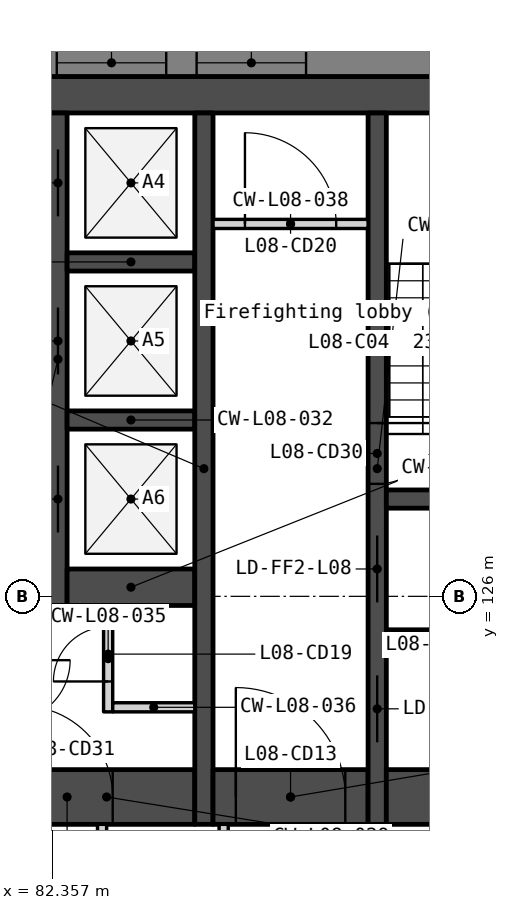
"""IFC4 building model, lengths in metres.
Left out: names, types, materials, properties, quantities, classifications, styles, units other than length and angle.
Written with IfcOpenShell. Run it as: python <this file> out.ifc"""

import sys

from ifc_helpers import new_model, si_unit, direction, frame, frame_2d, origin, place, context, subcontext, project, spatial, polyline, rectangle, outline, extrude, element, fill, save


model = new_model("IFC4")
c1 = context("Model", 3, precision=1e-05, world=origin(), true_north=direction((0.0, 1.0)))
c2 = subcontext(c1, "Body", "Model", "MODEL_VIEW")
j1 = project(units=[si_unit("LENGTHUNIT", "METRE"), si_unit("PLANEANGLEUNIT", "RADIAN")], contexts=[c1])
p1 = place(None, origin())
s1 = spatial("IfcSite", under=j1, at=p1, CompositionType="ELEMENT")
p2 = place(p1, origin())
s2 = spatial("IfcBuilding", under=s1, at=p2, CompositionType="ELEMENT")
p3 = place(p2, frame((0.0, 0.0, 42.0)))
s3 = spatial("IfcBuildingStorey", under=s2, at=p3, CompositionType="ELEMENT", Elevation=42.0)
p4 = place(p3, frame((66.0, 134.25, 0.0), z_axis=(0.0, 0.0, 1.0), x_axis=(1.0, 0.0, 0.0)))
e1 = element("IfcWall", 1, at=p4, inside=s3, PredefinedType="SOLIDWALL", context=c2, shape_type="SweptSolid", body=[
    extrude(rectangle(XDim=28.0, YDim=0.6, at=frame_2d((14.0, 0.0))), origin(), (0.0, 0.0, 1.0), 3.35),
])
p5 = place(p3, frame((81.8, 122.7, 0.0), z_axis=(0.0, 0.0, 1.0), x_axis=(1.0, 0.0, 0.0)))
e2 = element("IfcWall", 2, at=p5, inside=s3, PredefinedType="SOLIDWALL", context=c2, shape_type="SweptSolid", body=[
    extrude(rectangle(XDim=2.9, YDim=0.9, at=frame_2d((1.45, 0.0))), origin(), (0.0, 0.0, 1.0), 3.35),
])
p6 = place(p5, frame((0.05, 0.0, 0.0)))
e3 = element("IfcOpeningElement", 3, at=p6, cuts=e2, PredefinedType="OPENING", context=c2, shape_type="SweptSolid", body=[
    extrude(rectangle(XDim=1.5, YDim=2.1, at=frame_2d((0.75, 1.05))), frame((0.0, 0.46, 0.0), z_axis=(0.0, -1.0, 0.0), x_axis=(1.0, 0.0, 0.0)), (0.0, 0.0, 1.0), 0.92),
])
p7 = place(p3, frame((82.45, 133.95, 0.0), z_axis=(0.0, 0.0, 1.0), x_axis=(0.0, -1.0, 0.0)))
e4 = element("IfcWall", 4, at=p7, inside=s3, PredefinedType="SOLIDWALL", context=c2, shape_type="SweptSolid", body=[
    extrude(rectangle(XDim=8.1, YDim=0.3, at=frame_2d((4.05, 0.0))), origin(), (0.0, 0.0, 1.0), 3.35),
])
p8 = place(p7, frame((0.6, 0.0, 0.0)))
e5 = element("IfcOpeningElement", 5, at=p8, cuts=e4, PredefinedType="OPENING", context=c2, shape_type="SweptSolid", body=[
    extrude(rectangle(XDim=1.1, YDim=2.1, at=frame_2d((0.55, 1.05))), frame((0.0, 0.16, 0.0), z_axis=(0.0, -1.0, 0.0), x_axis=(1.0, 0.0, 0.0)), (0.0, 0.0, 1.0), 0.32),
])
p9 = place(p7, frame((3.2, 0.0, 0.0)))
e6 = element("IfcOpeningElement", 6, at=p9, cuts=e4, PredefinedType="OPENING", context=c2, shape_type="SweptSolid", body=[
    extrude(rectangle(XDim=1.1, YDim=2.1, at=frame_2d((0.55, 1.05))), frame((0.0, 0.16, 0.0), z_axis=(0.0, -1.0, 0.0), x_axis=(1.0, 0.0, 0.0)), (0.0, 0.0, 1.0), 0.32),
])
p10 = place(p7, frame((5.8, 0.0, 0.0)))
e7 = element("IfcOpeningElement", 7, at=p10, cuts=e4, PredefinedType="OPENING", context=c2, shape_type="SweptSolid", body=[
    extrude(rectangle(XDim=1.1, YDim=2.1, at=frame_2d((0.55, 1.05))), frame((0.0, 0.16, 0.0), z_axis=(0.0, -1.0, 0.0), x_axis=(1.0, 0.0, 0.0)), (0.0, 0.0, 1.0), 0.32),
])
for number, where, z_axis, x_axis in (
    (8, (82.6, 131.5, 0.0), (0.0, 0.0, 1.0), (1.0, 0.0, 0.0)),
    (9, (82.6, 128.9, 0.0), (0.0, 0.0, 1.0), (1.0, 0.0, 0.0)),
):
    element("IfcWall", number, at=place(p3, frame(where, z_axis=z_axis, x_axis=x_axis)), inside=s3, PredefinedType="SOLIDWALL", context=c2, shape_type="SweptSolid", body=[
        extrude(rectangle(XDim=2.1, YDim=0.3, at=frame_2d((1.05, 0.0))), origin(), (0.0, 0.0, 1.0), 3.35),
    ])
p11 = place(p3, frame((82.6, 126.15, 0.0), z_axis=(0.0, 0.0, 1.0), x_axis=(1.0, 0.0, 0.0)))
e10 = element("IfcWall", 10, at=p11, inside=s3, PredefinedType="SOLIDWALL", context=c2, shape_type="SweptSolid", body=[
    extrude(rectangle(XDim=2.1, YDim=0.6, at=frame_2d((1.05, 0.0))), origin(), (0.0, 0.0, 1.0), 3.35),
])
p12 = place(p3, frame((83.175, 122.25, 0.0), z_axis=(0.0, 0.0, 1.0), x_axis=(0.0, -1.0, 0.0)))
e11 = element("IfcWall", 11, at=p12, inside=s3, PredefinedType="PARTITIONING", context=c2, shape_type="SweptSolid", body=[
    extrude(rectangle(XDim=2.1, YDim=0.15, at=frame_2d((1.05, 0.0))), origin(), (0.0, 0.0, 1.0), 3.35),
])
p13 = place(p3, frame((83.275, 125.85, 0.0), z_axis=(0.0, 0.0, 1.0), x_axis=(0.0, -1.0, 0.0)))
e12 = element("IfcWall", 12, at=p13, inside=s3, PredefinedType="PARTITIONING", context=c2, shape_type="SweptSolid", body=[
    extrude(rectangle(XDim=1.75, YDim=0.15, at=frame_2d((0.875, 0.0))), origin(), (0.0, 0.0, 1.0), 3.35),
])
p14 = place(p13, frame((0.35, 0.0, 0.0)))
e13 = element("IfcOpeningElement", 13, at=p14, cuts=e12, PredefinedType="OPENING", context=c2, shape_type="SweptSolid", body=[
    extrude(rectangle(XDim=0.9, YDim=2.1, at=frame_2d((0.45, 1.05))), frame((0.0, 0.085, 0.0), z_axis=(0.0, -1.0, 0.0), x_axis=(1.0, 0.0, 0.0)), (0.0, 0.0, 1.0), 0.17),
])
p15 = place(p3, frame((83.35, 124.175, 0.0), z_axis=(0.0, 0.0, 1.0), x_axis=(1.0, 0.0, 0.0)))
e14 = element("IfcWall", 14, at=p15, inside=s3, PredefinedType="PARTITIONING", context=c2, shape_type="SweptSolid", body=[
    extrude(rectangle(XDim=1.35, YDim=0.15, at=frame_2d((0.675, 0.0))), origin(), (0.0, 0.0, 1.0), 3.35),
])
p16 = place(p3, frame((84.85, 133.95, 0.0), z_axis=(0.0, 0.0, 1.0), x_axis=(0.0, -1.0, 0.0)))
e15 = element("IfcWall", 15, at=p16, inside=s3, PredefinedType="SOLIDWALL", context=c2, shape_type="SweptSolid", body=[
    extrude(rectangle(XDim=11.7, YDim=0.3, at=frame_2d((5.85, 0.0))), origin(), (0.0, 0.0, 1.0), 3.35),
])
p17 = place(p3, frame((85.0, 132.125, 0.0), z_axis=(0.0, 0.0, 1.0), x_axis=(1.0, 0.0, 0.0)))
e16 = element("IfcWall", 16, at=p17, inside=s3, PredefinedType="PARTITIONING", context=c2, shape_type="SweptSolid", body=[
    extrude(rectangle(XDim=2.55, YDim=0.15, at=frame_2d((1.275, 0.0))), origin(), (0.0, 0.0, 1.0), 3.35),
])
p18 = place(p17, frame((0.525, 0.0, 0.0)))
e17 = element("IfcOpeningElement", 17, at=p18, cuts=e16, PredefinedType="OPENING", context=c2, shape_type="SweptSolid", body=[
    extrude(rectangle(XDim=1.5, YDim=2.1, at=frame_2d((0.75, 1.05))), frame((0.0, 0.085, 0.0), z_axis=(0.0, -1.0, 0.0), x_axis=(1.0, 0.0, 0.0)), (0.0, 0.0, 1.0), 0.17),
])
p19 = place(p3, frame((85.0, 122.7, 0.0), z_axis=(0.0, 0.0, 1.0), x_axis=(1.0, 0.0, 0.0)))
e18 = element("IfcWall", 18, at=p19, inside=s3, PredefinedType="SOLIDWALL", context=c2, shape_type="SweptSolid", body=[
    extrude(rectangle(XDim=2.55, YDim=0.9, at=frame_2d((1.275, 0.0))), origin(), (0.0, 0.0, 1.0), 3.35),
])
p20 = place(p19, frame((0.375, 0.0, 0.0)))
e19 = element("IfcOpeningElement", 19, at=p20, cuts=e18, PredefinedType="OPENING", context=c2, shape_type="SweptSolid", body=[
    extrude(rectangle(XDim=1.8, YDim=2.1, at=frame_2d((0.9, 1.05))), frame((0.0, 0.46, 0.0), z_axis=(0.0, -1.0, 0.0), x_axis=(1.0, 0.0, 0.0)), (0.0, 0.0, 1.0), 0.92),
])
p21 = place(p3, frame((85.175, 122.25, 0.0), z_axis=(0.0, 0.0, 1.0), x_axis=(0.0, -1.0, 0.0)))
e20 = element("IfcWall", 20, at=p21, inside=s3, PredefinedType="PARTITIONING", context=c2, shape_type="SweptSolid", body=[
    extrude(rectangle(XDim=2.1, YDim=0.15, at=frame_2d((1.05, 0.0))), origin(), (0.0, 0.0, 1.0), 3.35),
])
p22 = place(p21, frame((0.55, 0.0, 0.0)))
e21 = element("IfcOpeningElement", 21, at=p22, cuts=e20, PredefinedType="OPENING", context=c2, shape_type="SweptSolid", body=[
    extrude(rectangle(XDim=1.0, YDim=2.1, at=frame_2d((0.5, 1.05))), frame((0.0, 0.085, 0.0), z_axis=(0.0, -1.0, 0.0), x_axis=(1.0, 0.0, 0.0)), (0.0, 0.0, 1.0), 0.17),
])
p23 = place(p3, frame((87.375, 122.25, 0.0), z_axis=(0.0, 0.0, 1.0), x_axis=(0.0, -1.0, 0.0)))
e22 = element("IfcWall", 22, at=p23, inside=s3, PredefinedType="PARTITIONING", context=c2, shape_type="SweptSolid", body=[
    extrude(rectangle(XDim=2.1, YDim=0.15, at=frame_2d((1.05, 0.0))), origin(), (0.0, 0.0, 1.0), 3.35),
])
p24 = place(p3, frame((87.7, 133.95, 0.0), z_axis=(0.0, 0.0, 1.0), x_axis=(0.0, -1.0, 0.0)))
e23 = element("IfcWall", 23, at=p24, inside=s3, PredefinedType="SOLIDWALL", context=c2, shape_type="SweptSolid", body=[
    extrude(rectangle(XDim=11.7, YDim=0.3, at=frame_2d((5.85, 0.0))), origin(), (0.0, 0.0, 1.0), 3.35),
])
p25 = place(p24, frame((6.95, 0.0, 0.0)))
e24 = element("IfcOpeningElement", 24, at=p25, cuts=e23, PredefinedType="OPENING", context=c2, shape_type="SweptSolid", body=[
    extrude(rectangle(XDim=1.1, YDim=2.1, at=frame_2d((0.55, 1.05))), frame((0.0, 0.16, 0.0), z_axis=(0.0, -1.0, 0.0), x_axis=(1.0, 0.0, 0.0)), (0.0, 0.0, 1.0), 0.32),
])
p26 = place(p24, frame((5.1, 0.0, 0.0)))
e25 = element("IfcOpeningElement", 25, at=p26, cuts=e23, PredefinedType="OPENING", context=c2, shape_type="SweptSolid", body=[
    extrude(rectangle(XDim=1.0, YDim=2.1, at=frame_2d((0.5, 1.05))), frame((0.0, 0.16, 0.0), z_axis=(0.0, -1.0, 0.0), x_axis=(1.0, 0.0, 0.0)), (0.0, 0.0, 1.0), 0.32),
])
p27 = place(p24, frame((9.25, 0.0, 0.0)))
e26 = element("IfcOpeningElement", 26, at=p27, cuts=e23, PredefinedType="OPENING", context=c2, shape_type="SweptSolid", body=[
    extrude(rectangle(XDim=1.1, YDim=2.1, at=frame_2d((0.55, 1.05))), frame((0.0, 0.16, 0.0), z_axis=(0.0, -1.0, 0.0), x_axis=(1.0, 0.0, 0.0)), (0.0, 0.0, 1.0), 0.32),
])
for number, where, z_axis, x_axis in (
    (27, (87.85, 127.6, 0.0), (0.0, 0.0, 1.0), (1.0, 0.0, 0.0)),
    (28, (87.85, 125.3, 0.0), (0.0, 0.0, 1.0), (1.0, 0.0, 0.0)),
):
    element("IfcWall", number, at=place(p3, frame(where, z_axis=z_axis, x_axis=x_axis)), inside=s3, PredefinedType="SOLIDWALL", context=c2, shape_type="SweptSolid", body=[
        extrude(rectangle(XDim=2.55, YDim=0.3, at=frame_2d((1.275, 0.0))), origin(), (0.0, 0.0, 1.0), 3.35),
    ])
p28 = place(p3, frame((87.85, 122.7, 0.0), z_axis=(0.0, 0.0, 1.0), x_axis=(1.0, 0.0, 0.0)))
e29 = element("IfcWall", 29, at=p28, inside=s3, PredefinedType="SOLIDWALL", context=c2, shape_type="SweptSolid", body=[
    extrude(rectangle(XDim=2.55, YDim=0.9, at=frame_2d((1.275, 0.0))), origin(), (0.0, 0.0, 1.0), 3.35),
])
p29 = place(p3, frame((102.4, 134.775, -0.15), z_axis=(0.0, 0.0, 1.0), x_axis=(-1.0, 0.0, 0.0)))
e30 = element("IfcWall", 30, at=p29, inside=s3, PredefinedType="SOLIDWALL", context=c2, shape_type="SweptSolid", body=[
    extrude(outline(polyline([(44.8, 0.0), (44.8, 3.5), (0.0, 3.5), (0.0, 0.0), (44.8, 0.0)])), frame((0.0, 0.225, 0.0), z_axis=(0.0, -1.0, 0.0), x_axis=(1.0, 0.0, 0.0)), (0.0, 0.0, 1.0), 0.45),
])
p30 = place(p29, frame((0.786, 0.0, 1.05)))
e31 = element("IfcOpeningElement", 31, at=p30, cuts=e30, PredefinedType="OPENING", context=c2, shape_type="SweptSolid", body=[
    extrude(rectangle(XDim=1.2, YDim=1.5, at=frame_2d((0.6, 0.75))), frame((0.0, 0.235, 0.0), z_axis=(0.0, -1.0, 0.0), x_axis=(1.0, 0.0, 0.0)), (0.0, 0.0, 1.0), 0.47),
])
p31 = place(p29, frame((6.91, 0.0, 1.05)))
e32 = element("IfcOpeningElement", 32, at=p31, cuts=e30, PredefinedType="OPENING", context=c2, shape_type="SweptSolid", body=[
    extrude(rectangle(XDim=1.8, YDim=1.5, at=frame_2d((0.9, 0.75))), frame((0.0, 0.235, 0.0), z_axis=(0.0, -1.0, 0.0), x_axis=(1.0, 0.0, 0.0)), (0.0, 0.0, 1.0), 0.47),
])
p32 = place(p29, frame((9.21, 0.0, 1.05)))
e33 = element("IfcOpeningElement", 33, at=p32, cuts=e30, PredefinedType="OPENING", context=c2, shape_type="SweptSolid", body=[
    extrude(rectangle(XDim=1.8, YDim=1.5, at=frame_2d((0.9, 0.75))), frame((0.0, 0.235, 0.0), z_axis=(0.0, -1.0, 0.0), x_axis=(1.0, 0.0, 0.0)), (0.0, 0.0, 1.0), 0.47),
])
p33 = place(p29, frame((15.87, 0.0, 1.05)))
e34 = element("IfcOpeningElement", 34, at=p33, cuts=e30, PredefinedType="OPENING", context=c2, shape_type="SweptSolid", body=[
    extrude(rectangle(XDim=1.8, YDim=1.5, at=frame_2d((0.9, 0.75))), frame((0.0, 0.235, 0.0), z_axis=(0.0, -1.0, 0.0), x_axis=(1.0, 0.0, 0.0)), (0.0, 0.0, 1.0), 0.47),
])
p34 = place(p29, frame((18.17, 0.0, 1.05)))
e35 = element("IfcOpeningElement", 35, at=p34, cuts=e30, PredefinedType="OPENING", context=c2, shape_type="SweptSolid", body=[
    extrude(rectangle(XDim=1.8, YDim=1.5, at=frame_2d((0.9, 0.75))), frame((0.0, 0.235, 0.0), z_axis=(0.0, -1.0, 0.0), x_axis=(1.0, 0.0, 0.0)), (0.0, 0.0, 1.0), 0.47),
])
p35 = place(p29, frame((24.83, 0.0, 1.05)))
e36 = element("IfcOpeningElement", 36, at=p35, cuts=e30, PredefinedType="OPENING", context=c2, shape_type="SweptSolid", body=[
    extrude(rectangle(XDim=1.8, YDim=1.5, at=frame_2d((0.9, 0.75))), frame((0.0, 0.235, 0.0), z_axis=(0.0, -1.0, 0.0), x_axis=(1.0, 0.0, 0.0)), (0.0, 0.0, 1.0), 0.47),
])
p36 = place(p29, frame((27.13, 0.0, 1.05)))
e37 = element("IfcOpeningElement", 37, at=p36, cuts=e30, PredefinedType="OPENING", context=c2, shape_type="SweptSolid", body=[
    extrude(rectangle(XDim=1.8, YDim=1.5, at=frame_2d((0.9, 0.75))), frame((0.0, 0.235, 0.0), z_axis=(0.0, -1.0, 0.0), x_axis=(1.0, 0.0, 0.0)), (0.0, 0.0, 1.0), 0.47),
])
p37 = place(p29, frame((33.79, 0.0, 1.05)))
e38 = element("IfcOpeningElement", 38, at=p37, cuts=e30, PredefinedType="OPENING", context=c2, shape_type="SweptSolid", body=[
    extrude(rectangle(XDim=1.8, YDim=1.5, at=frame_2d((0.9, 0.75))), frame((0.0, 0.235, 0.0), z_axis=(0.0, -1.0, 0.0), x_axis=(1.0, 0.0, 0.0)), (0.0, 0.0, 1.0), 0.47),
])
p38 = place(p29, frame((36.09, 0.0, 1.05)))
e39 = element("IfcOpeningElement", 39, at=p38, cuts=e30, PredefinedType="OPENING", context=c2, shape_type="SweptSolid", body=[
    extrude(rectangle(XDim=1.8, YDim=1.5, at=frame_2d((0.9, 0.75))), frame((0.0, 0.235, 0.0), z_axis=(0.0, -1.0, 0.0), x_axis=(1.0, 0.0, 0.0)), (0.0, 0.0, 1.0), 0.47),
])
p39 = place(p29, frame((42.814, 0.0, 1.05)))
e40 = element("IfcOpeningElement", 40, at=p39, cuts=e30, PredefinedType="OPENING", context=c2, shape_type="SweptSolid", body=[
    extrude(rectangle(XDim=1.2, YDim=1.5, at=frame_2d((0.6, 0.75))), frame((0.0, 0.235, 0.0), z_axis=(0.0, -1.0, 0.0), x_axis=(1.0, 0.0, 0.0)), (0.0, 0.0, 1.0), 0.47),
])
p40 = place(p3, frame((83.105, 90.599, -0.15), z_axis=(0.0, 0.0, 1.0), x_axis=(0.499999201451, 0.866025864826, 0.0)))
e41 = element("IfcWall", 41, at=p40, inside=s3, PredefinedType="SOLIDWALL", context=c2, shape_type="SweptSolid", body=[
    extrude(outline(polyline([(44.8, 0.0), (44.8, 3.5), (0.0, 3.5), (0.0, 0.0), (44.8, 0.0)])), frame((0.0, 0.225, 0.0), z_axis=(0.0, -1.0, 0.0), x_axis=(1.0, 0.0, 0.0)), (0.0, 0.0, 1.0), 0.45),
])
p41 = place(p40, frame((0.786, 0.0, 1.05)))
e42 = element("IfcOpeningElement", 42, at=p41, cuts=e41, PredefinedType="OPENING", context=c2, shape_type="SweptSolid", body=[
    extrude(rectangle(XDim=1.2, YDim=1.5, at=frame_2d((0.6, 0.75))), frame((0.0, 0.235, 0.0), z_axis=(0.0, -1.0, 0.0), x_axis=(1.0, 0.0, 0.0)), (0.0, 0.0, 1.0), 0.47),
])
p42 = place(p40, frame((6.91, 0.0, 1.05)))
e43 = element("IfcOpeningElement", 43, at=p42, cuts=e41, PredefinedType="OPENING", context=c2, shape_type="SweptSolid", body=[
    extrude(rectangle(XDim=1.8, YDim=1.5, at=frame_2d((0.9, 0.75))), frame((0.0, 0.235, 0.0), z_axis=(0.0, -1.0, 0.0), x_axis=(1.0, 0.0, 0.0)), (0.0, 0.0, 1.0), 0.47),
])
p43 = place(p40, frame((9.21, 0.0, 1.05)))
e44 = element("IfcOpeningElement", 44, at=p43, cuts=e41, PredefinedType="OPENING", context=c2, shape_type="SweptSolid", body=[
    extrude(rectangle(XDim=1.8, YDim=1.5, at=frame_2d((0.9, 0.75))), frame((0.0, 0.235, 0.0), z_axis=(0.0, -1.0, 0.0), x_axis=(1.0, 0.0, 0.0)), (0.0, 0.0, 1.0), 0.47),
])
p44 = place(p40, frame((15.87, 0.0, 1.05)))
e45 = element("IfcOpeningElement", 45, at=p44, cuts=e41, PredefinedType="OPENING", context=c2, shape_type="SweptSolid", body=[
    extrude(rectangle(XDim=1.8, YDim=1.5, at=frame_2d((0.9, 0.75))), frame((0.0, 0.235, 0.0), z_axis=(0.0, -1.0, 0.0), x_axis=(1.0, 0.0, 0.0)), (0.0, 0.0, 1.0), 0.47),
])
p45 = place(p40, frame((18.17, 0.0, 1.05)))
e46 = element("IfcOpeningElement", 46, at=p45, cuts=e41, PredefinedType="OPENING", context=c2, shape_type="SweptSolid", body=[
    extrude(rectangle(XDim=1.8, YDim=1.5, at=frame_2d((0.9, 0.75))), frame((0.0, 0.235, 0.0), z_axis=(0.0, -1.0, 0.0), x_axis=(1.0, 0.0, 0.0)), (0.0, 0.0, 1.0), 0.47),
])
p46 = place(p40, frame((24.83, 0.0, 1.05)))
e47 = element("IfcOpeningElement", 47, at=p46, cuts=e41, PredefinedType="OPENING", context=c2, shape_type="SweptSolid", body=[
    extrude(rectangle(XDim=1.8, YDim=1.5, at=frame_2d((0.9, 0.75))), frame((0.0, 0.235, 0.0), z_axis=(0.0, -1.0, 0.0), x_axis=(1.0, 0.0, 0.0)), (0.0, 0.0, 1.0), 0.47),
])
p47 = place(p40, frame((27.13, 0.0, 1.05)))
e48 = element("IfcOpeningElement", 48, at=p47, cuts=e41, PredefinedType="OPENING", context=c2, shape_type="SweptSolid", body=[
    extrude(rectangle(XDim=1.8, YDim=1.5, at=frame_2d((0.9, 0.75))), frame((0.0, 0.235, 0.0), z_axis=(0.0, -1.0, 0.0), x_axis=(1.0, 0.0, 0.0)), (0.0, 0.0, 1.0), 0.47),
])
p48 = place(p40, frame((33.79, 0.0, 1.05)))
e49 = element("IfcOpeningElement", 49, at=p48, cuts=e41, PredefinedType="OPENING", context=c2, shape_type="SweptSolid", body=[
    extrude(rectangle(XDim=1.8, YDim=1.5, at=frame_2d((0.9, 0.75))), frame((0.0, 0.235, 0.0), z_axis=(0.0, -1.0, 0.0), x_axis=(1.0, 0.0, 0.0)), (0.0, 0.0, 1.0), 0.47),
])
p49 = place(p40, frame((36.09, 0.0, 1.05)))
e50 = element("IfcOpeningElement", 50, at=p49, cuts=e41, PredefinedType="OPENING", context=c2, shape_type="SweptSolid", body=[
    extrude(rectangle(XDim=1.8, YDim=1.5, at=frame_2d((0.9, 0.75))), frame((0.0, 0.235, 0.0), z_axis=(0.0, -1.0, 0.0), x_axis=(1.0, 0.0, 0.0)), (0.0, 0.0, 1.0), 0.47),
])
p50 = place(p40, frame((42.814, 0.0, 1.05)))
e51 = element("IfcOpeningElement", 51, at=p50, cuts=e41, PredefinedType="OPENING", context=c2, shape_type="SweptSolid", body=[
    extrude(rectangle(XDim=1.2, YDim=1.5, at=frame_2d((0.6, 0.75))), frame((0.0, 0.235, 0.0), z_axis=(0.0, -1.0, 0.0), x_axis=(1.0, 0.0, 0.0)), (0.0, 0.0, 1.0), 0.47),
])
p51 = place(p8, origin())
e52 = element("IfcDoor", 52, at=p51, inside=s3, OperationType="SLIDING_TO_LEFT", PredefinedType="DOOR", context=c2, shape_type="SweptSolid", body=[
    extrude(rectangle(XDim=1.1, YDim=2.1, at=frame_2d((0.55, 1.05))), frame((0.0, 0.025, 0.0), z_axis=(0.0, -1.0, 0.0), x_axis=(1.0, 0.0, 0.0)), (0.0, 0.0, 1.0), 0.05),
])
fill(e5, e52)
p52 = place(p9, origin())
e53 = element("IfcDoor", 53, at=p52, inside=s3, OperationType="SLIDING_TO_LEFT", PredefinedType="DOOR", context=c2, shape_type="SweptSolid", body=[
    extrude(rectangle(XDim=1.1, YDim=2.1, at=frame_2d((0.55, 1.05))), frame((0.0, 0.025, 0.0), z_axis=(0.0, -1.0, 0.0), x_axis=(1.0, 0.0, 0.0)), (0.0, 0.0, 1.0), 0.05),
])
fill(e6, e53)
p53 = place(p10, origin())
e54 = element("IfcDoor", 54, at=p53, inside=s3, OperationType="SLIDING_TO_LEFT", PredefinedType="DOOR", context=c2, shape_type="SweptSolid", body=[
    extrude(rectangle(XDim=1.1, YDim=2.1, at=frame_2d((0.55, 1.05))), frame((0.0, 0.025, 0.0), z_axis=(0.0, -1.0, 0.0), x_axis=(1.0, 0.0, 0.0)), (0.0, 0.0, 1.0), 0.05),
])
fill(e7, e54)
p54 = place(p25, origin())
e55 = element("IfcDoor", 55, at=p54, inside=s3, OperationType="SLIDING_TO_LEFT", PredefinedType="DOOR", context=c2, shape_type="SweptSolid", body=[
    extrude(rectangle(XDim=1.1, YDim=2.1, at=frame_2d((0.55, 1.05))), frame((0.0, 0.025, 0.0), z_axis=(0.0, -1.0, 0.0), x_axis=(1.0, 0.0, 0.0)), (0.0, 0.0, 1.0), 0.05),
])
fill(e24, e55)
p55 = place(p20, origin())
e56 = element("IfcDoor", 56, at=p55, inside=s3, OperationType="DOUBLE_DOOR_DOUBLE_SWING", PredefinedType="DOOR", context=c2, shape_type="SweptSolid", body=[
    extrude(rectangle(XDim=1.8, YDim=2.1, at=frame_2d((0.9, 1.05))), frame((0.0, 0.025, 0.0), z_axis=(0.0, -1.0, 0.0), x_axis=(1.0, 0.0, 0.0)), (0.0, 0.0, 1.0), 0.05),
])
fill(e19, e56)
p56 = place(p6, origin())
e57 = element("IfcDoor", 57, at=p56, inside=s3, OperationType="DOUBLE_DOOR_DOUBLE_SWING", PredefinedType="DOOR", context=c2, shape_type="SweptSolid", body=[
    extrude(rectangle(XDim=1.5, YDim=2.1, at=frame_2d((0.75, 1.05))), frame((0.0, 0.025, 0.0), z_axis=(0.0, -1.0, 0.0), x_axis=(1.0, 0.0, 0.0)), (0.0, 0.0, 1.0), 0.05),
])
fill(e3, e57)
p57 = place(p14, origin())
e58 = element("IfcDoor", 58, at=p57, inside=s3, OperationType="SINGLE_SWING_RIGHT", PredefinedType="DOOR", context=c2, shape_type="SweptSolid", body=[
    extrude(rectangle(XDim=0.9, YDim=2.1, at=frame_2d((0.45, 1.05))), frame((0.0, 0.025, 0.0), z_axis=(0.0, -1.0, 0.0), x_axis=(1.0, 0.0, 0.0)), (0.0, 0.0, 1.0), 0.05),
])
fill(e13, e58)
p58 = place(p18, origin())
e59 = element("IfcDoor", 59, at=p58, inside=s3, OperationType="DOUBLE_DOOR_DOUBLE_SWING", PredefinedType="DOOR", context=c2, shape_type="SweptSolid", body=[
    extrude(rectangle(XDim=1.5, YDim=2.1, at=frame_2d((0.75, 1.05))), frame((0.0, 0.025, 0.0), z_axis=(0.0, -1.0, 0.0), x_axis=(1.0, 0.0, 0.0)), (0.0, 0.0, 1.0), 0.05),
])
fill(e17, e59)
p59 = place(p26, origin())
e60 = element("IfcDoor", 60, at=p59, inside=s3, OperationType="SINGLE_SWING_LEFT", PredefinedType="DOOR", context=c2, shape_type="SweptSolid", body=[
    extrude(rectangle(XDim=1.0, YDim=2.1, at=frame_2d((0.5, 1.05))), frame((0.0, 0.025, 0.0), z_axis=(0.0, -1.0, 0.0), x_axis=(1.0, 0.0, 0.0)), (0.0, 0.0, 1.0), 0.05),
])
fill(e25, e60)
p60 = place(p27, origin())
e61 = element("IfcDoor", 61, at=p60, inside=s3, OperationType="SLIDING_TO_LEFT", PredefinedType="DOOR", context=c2, shape_type="SweptSolid", body=[
    extrude(rectangle(XDim=1.1, YDim=2.1, at=frame_2d((0.55, 1.05))), frame((0.0, 0.025, 0.0), z_axis=(0.0, -1.0, 0.0), x_axis=(1.0, 0.0, 0.0)), (0.0, 0.0, 1.0), 0.05),
])
fill(e26, e61)
p61 = place(p33, origin())
e62 = element("IfcWindow", 62, at=p61, inside=s3, PartitioningType="SINGLE_PANEL", PredefinedType="WINDOW", context=c2, shape_type="SweptSolid", body=[
    extrude(rectangle(XDim=1.8, YDim=1.5, at=frame_2d((0.9, 0.75))), frame((0.0, 0.03, 0.0), z_axis=(0.0, -1.0, 0.0), x_axis=(1.0, 0.0, 0.0)), (0.0, 0.0, 1.0), 0.06),
])
fill(e34, e62)
p62 = place(p34, origin())
e63 = element("IfcWindow", 63, at=p62, inside=s3, PartitioningType="SINGLE_PANEL", PredefinedType="WINDOW", context=c2, shape_type="SweptSolid", body=[
    extrude(rectangle(XDim=1.8, YDim=1.5, at=frame_2d((0.9, 0.75))), frame((0.0, 0.03, 0.0), z_axis=(0.0, -1.0, 0.0), x_axis=(1.0, 0.0, 0.0)), (0.0, 0.0, 1.0), 0.06),
])
fill(e35, e63)
save(model, sys.argv[1])
